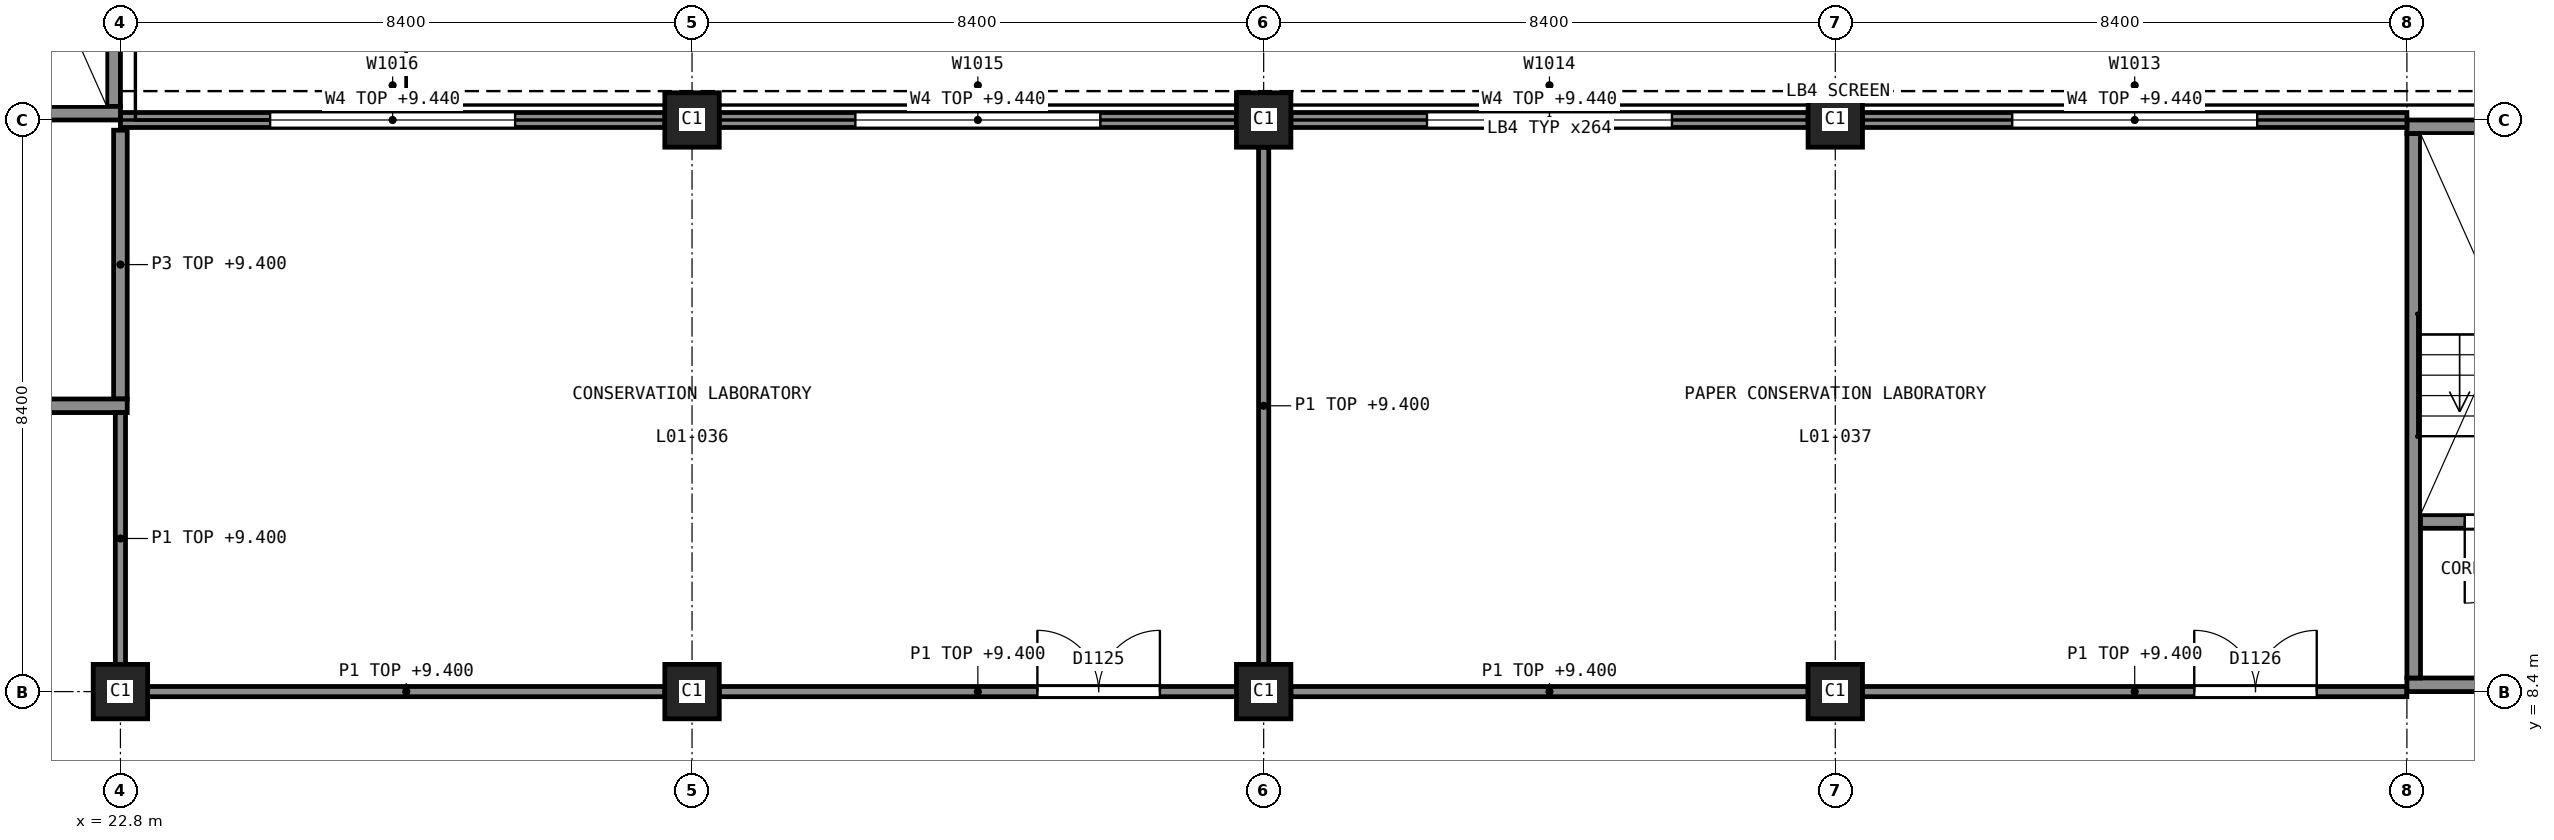
"""IFC4 building model, lengths in metres.
Left out: names, types, materials, properties, quantities, classifications, styles, units other than length and angle.
Written with IfcOpenShell. Run it as: python <this file> out.ifc"""

import sys

from ifc_helpers import new_model, si_unit, direction, frame, frame_2d, origin, origin_2d, place, context, subcontext, project, spatial, rectangle, extrude, element, fill, save


model = new_model("IFC4")
c1 = context("Model", 3, precision=1e-05, world=origin(), true_north=direction((0.0, 1.0)))
c2 = subcontext(c1, "Body", "Model", "MODEL_VIEW")
j1 = project(units=[si_unit("LENGTHUNIT", "METRE"), si_unit("PLANEANGLEUNIT", "RADIAN")], contexts=[c1])
p1 = place(None, origin())
s1 = spatial("IfcSite", under=j1, at=p1, CompositionType="ELEMENT")
p2 = place(p1, origin())
s2 = spatial("IfcBuilding", under=s1, at=p2, CompositionType="ELEMENT")
p3 = place(p2, frame((0.0, 0.0, 5.5)))
s3 = spatial("IfcBuildingStorey", under=s2, at=p3, CompositionType="ELEMENT", Elevation=5.5)
p4 = place(p3, frame((14.4, 16.9, 0.0), z_axis=(0.0, 0.0, 1.0), x_axis=(1.0, 0.0, 0.0)))
e1 = element("IfcWall", 1, at=p4, inside=s3, PredefinedType="SHEAR", context=c2, shape_type="SweptSolid", body=[
    extrude(rectangle(XDim=8.4, YDim=0.2, at=frame_2d((4.2, 0.0))), origin(), (0.0, 0.0, 1.0), 5.0),
])
p5 = place(p3, frame((22.7, 17.0, 0.0), z_axis=(0.0, 0.0, 1.0), x_axis=(0.0, 1.0, 0.0)))
e2 = element("IfcWall", 2, at=p5, inside=s3, PredefinedType="SHEAR", context=c2, shape_type="SweptSolid", body=[
    extrude(rectangle(XDim=8.0, YDim=0.2, at=frame_2d((4.0, 0.0))), origin(), (0.0, 0.0, 1.0), 5.0),
])
p6 = place(p3, frame((56.4, 8.5, 0.0), z_axis=(0.0, 0.0, 1.0), x_axis=(1.0, 0.0, 0.0)))
e3 = element("IfcWall", 3, at=p6, inside=s3, PredefinedType="SHEAR", context=c2, shape_type="SweptSolid", body=[
    extrude(rectangle(XDim=8.4, YDim=0.2, at=frame_2d((4.2, 0.0))), origin(), (0.0, 0.0, 1.0), 5.0),
])
p7 = place(p6, frame((3.3, 0.0, 0.0)))
e4 = element("IfcOpeningElement", 4, at=p7, cuts=e3, PredefinedType="OPENING", context=c2, shape_type="SweptSolid", body=[
    extrude(rectangle(XDim=1.8, YDim=2.1, at=frame_2d((0.9, 1.05))), frame((0.0, 0.11, 0.0), z_axis=(0.0, -1.0, 0.0), x_axis=(1.0, 0.0, 0.0)), (0.0, 0.0, 1.0), 0.22),
])
p8 = place(p3, frame((56.4, 16.7, 0.0), z_axis=(0.0, 0.0, 1.0), x_axis=(1.0, 0.0, 0.0)))
e5 = element("IfcWall", 5, at=p8, inside=s3, PredefinedType="SHEAR", context=c2, shape_type="SweptSolid", body=[
    extrude(rectangle(XDim=8.4, YDim=0.2, at=frame_2d((4.2, 0.0))), origin(), (0.0, 0.0, 1.0), 5.0),
])
p9 = place(p3, frame((56.5, 8.6, 0.0), z_axis=(0.0, 0.0, 1.0), x_axis=(0.0, 1.0, 0.0)))
e6 = element("IfcWall", 6, at=p9, inside=s3, PredefinedType="SHEAR", context=c2, shape_type="SweptSolid", body=[
    extrude(rectangle(XDim=8.0, YDim=0.2, at=frame_2d((4.0, 0.0))), origin(), (0.0, 0.0, 1.0), 5.0),
])
p10 = place(p3, frame((56.6, 10.9, 0.0), z_axis=(0.0, 0.0, 1.0), x_axis=(1.0, 0.0, 0.0)))
e7 = element("IfcWall", 7, at=p10, inside=s3, PredefinedType="SHEAR", context=c2, shape_type="SweptSolid", body=[
    extrude(rectangle(XDim=8.0, YDim=0.2, at=frame_2d((4.0, 0.0))), origin(), (0.0, 0.0, 1.0), 5.0),
])
p11 = place(p10, frame((0.65, 0.0, 0.0)))
e8 = element("IfcOpeningElement", 8, at=p11, cuts=e7, PredefinedType="OPENING", context=c2, shape_type="SweptSolid", body=[
    extrude(rectangle(XDim=1.2, YDim=2.1, at=frame_2d((0.6, 1.05))), frame((0.0, 0.11, 0.0), z_axis=(0.0, -1.0, 0.0), x_axis=(1.0, 0.0, 0.0)), (0.0, 0.0, 1.0), 0.22),
])
p12 = place(p10, frame((6.15, 0.0, 0.0)))
e9 = element("IfcOpeningElement", 9, at=p12, cuts=e7, PredefinedType="OPENING", context=c2, shape_type="SweptSolid", body=[
    extrude(rectangle(XDim=1.2, YDim=2.1, at=frame_2d((0.6, 1.05))), frame((0.0, 0.11, 0.0), z_axis=(0.0, -1.0, 0.0), x_axis=(1.0, 0.0, 0.0)), (0.0, 0.0, 1.0), 0.22),
])
p13 = place(p10, frame((3.45, 0.0, 0.0)))
e10 = element("IfcOpeningElement", 10, at=p13, cuts=e7, PredefinedType="OPENING", context=c2, shape_type="SweptSolid", body=[
    extrude(rectangle(XDim=1.1, YDim=2.1, at=frame_2d((0.55, 1.05))), frame((0.0, 0.11, 0.0), z_axis=(0.0, -1.0, 0.0), x_axis=(1.0, 0.0, 0.0)), (0.0, 0.0, 1.0), 0.22),
])
for number, where, z_axis, x_axis in (
    (11, (22.8, 8.4, 0.0), (0.0, 0.0, 1.0), (1.0, 0.0, 0.0)),
    (12, (31.2, 8.4, 0.0), (0.0, 0.0, 1.0), (1.0, 0.0, 0.0)),
    (13, (31.2, 16.8, 0.0), (0.0, 0.0, 1.0), (1.0, 0.0, 0.0)),
    (14, (39.6, 8.4, 0.0), (0.0, 0.0, 1.0), (1.0, 0.0, 0.0)),
    (15, (39.6, 16.8, 0.0), (0.0, 0.0, 1.0), (1.0, 0.0, 0.0)),
    (16, (48.0, 8.4, 0.0), (0.0, 0.0, 1.0), (1.0, 0.0, 0.0)),
    (17, (48.0, 16.8, 0.0), (0.0, 0.0, 1.0), (1.0, 0.0, 0.0)),
):
    element("IfcColumn", number, at=place(p3, frame(where, z_axis=z_axis, x_axis=x_axis)), inside=s3, PredefinedType="COLUMN", context=c2, shape_type="SweptSolid", body=[
        extrude(rectangle(XDim=0.8, YDim=0.8, at=origin_2d()), origin(), (0.0, 0.0, 1.0), 5.0),
    ])
p14 = place(p3, frame((48.4, 16.8, 0.0), z_axis=(0.0, 0.0, 1.0), x_axis=(1.0, 0.0, 0.0)))
e18 = element("IfcWall", 18, at=p14, inside=s3, PredefinedType="SOLIDWALL", context=c2, shape_type="SweptSolid", body=[
    extrude(rectangle(XDim=8.0, YDim=0.22, at=frame_2d((4.0, 0.0))), origin(), (0.0, 0.0, 1.0), 3.94),
])
p15 = place(p14, frame((2.2, 0.0, 0.9)))
e19 = element("IfcOpeningElement", 19, at=p15, cuts=e18, PredefinedType="OPENING", context=c2, shape_type="SweptSolid", body=[
    extrude(rectangle(XDim=3.6, YDim=1.5, at=frame_2d((1.8, 0.75))), frame((0.0, 0.12, 0.0), z_axis=(0.0, -1.0, 0.0), x_axis=(1.0, 0.0, 0.0)), (0.0, 0.0, 1.0), 0.24),
])
p16 = place(p3, frame((40.0, 16.8, 0.0), z_axis=(0.0, 0.0, 1.0), x_axis=(1.0, 0.0, 0.0)))
e20 = element("IfcWall", 20, at=p16, inside=s3, PredefinedType="SOLIDWALL", context=c2, shape_type="SweptSolid", body=[
    extrude(rectangle(XDim=7.6, YDim=0.22, at=frame_2d((3.8, 0.0))), origin(), (0.0, 0.0, 1.0), 3.94),
])
p17 = place(p16, frame((2.0, 0.0, 0.9)))
e21 = element("IfcOpeningElement", 21, at=p17, cuts=e20, PredefinedType="OPENING", context=c2, shape_type="SweptSolid", body=[
    extrude(rectangle(XDim=3.6, YDim=1.5, at=frame_2d((1.8, 0.75))), frame((0.0, 0.12, 0.0), z_axis=(0.0, -1.0, 0.0), x_axis=(1.0, 0.0, 0.0)), (0.0, 0.0, 1.0), 0.24),
])
p18 = place(p3, frame((31.6, 16.8, 0.0), z_axis=(0.0, 0.0, 1.0), x_axis=(1.0, 0.0, 0.0)))
e22 = element("IfcWall", 22, at=p18, inside=s3, PredefinedType="SOLIDWALL", context=c2, shape_type="SweptSolid", body=[
    extrude(rectangle(XDim=7.6, YDim=0.22, at=frame_2d((3.8, 0.0))), origin(), (0.0, 0.0, 1.0), 3.94),
])
p19 = place(p18, frame((2.0, 0.0, 0.9)))
e23 = element("IfcOpeningElement", 23, at=p19, cuts=e22, PredefinedType="OPENING", context=c2, shape_type="SweptSolid", body=[
    extrude(rectangle(XDim=3.6, YDim=1.5, at=frame_2d((1.8, 0.75))), frame((0.0, 0.12, 0.0), z_axis=(0.0, -1.0, 0.0), x_axis=(1.0, 0.0, 0.0)), (0.0, 0.0, 1.0), 0.24),
])
p20 = place(p3, frame((22.8, 16.8, 0.0), z_axis=(0.0, 0.0, 1.0), x_axis=(1.0, 0.0, 0.0)))
e24 = element("IfcWall", 24, at=p20, inside=s3, PredefinedType="SOLIDWALL", context=c2, shape_type="SweptSolid", body=[
    extrude(rectangle(XDim=8.0, YDim=0.22, at=frame_2d((4.0, 0.0))), origin(), (0.0, 0.0, 1.0), 3.94),
])
p21 = place(p20, frame((2.2, 0.0, 0.9)))
e25 = element("IfcOpeningElement", 25, at=p21, cuts=e24, PredefinedType="OPENING", context=c2, shape_type="SweptSolid", body=[
    extrude(rectangle(XDim=3.6, YDim=1.5, at=frame_2d((1.8, 0.75))), frame((0.0, 0.12, 0.0), z_axis=(0.0, -1.0, 0.0), x_axis=(1.0, 0.0, 0.0)), (0.0, 0.0, 1.0), 0.24),
])
p22 = place(p3, frame((22.8, 12.7, 0.0), z_axis=(0.0, 0.0, 1.0), x_axis=(0.0, 1.0, 0.0)))
e26 = element("IfcWall", 26, at=p22, inside=s3, PredefinedType="PARTITIONING", context=c2, shape_type="SweptSolid", body=[
    extrude(rectangle(XDim=3.95, YDim=0.2, at=frame_2d((1.975, 0.0))), origin(), (0.0, 0.0, 1.0), 3.9),
])
p23 = place(p3, frame((14.4, 12.6, 0.0), z_axis=(0.0, 0.0, 1.0), x_axis=(1.0, 0.0, 0.0)))
e27 = element("IfcWall", 27, at=p23, inside=s3, PredefinedType="PARTITIONING", context=c2, shape_type="SweptSolid", body=[
    extrude(rectangle(XDim=8.5, YDim=0.2, at=frame_2d((4.25, 0.0))), origin(), (0.0, 0.0, 1.0), 3.9),
])
p24 = place(p23, frame((1.775, 0.0, 0.0)))
e28 = element("IfcOpeningElement", 28, at=p24, cuts=e27, PredefinedType="OPENING", context=c2, shape_type="SweptSolid", body=[
    extrude(rectangle(XDim=1.0, YDim=2.1, at=frame_2d((0.5, 1.05))), frame((0.0, 0.11, 0.0), z_axis=(0.0, -1.0, 0.0), x_axis=(1.0, 0.0, 0.0)), (0.0, 0.0, 1.0), 0.22),
])
p25 = place(p3, frame((39.6, 8.8, 0.0), z_axis=(0.0, 0.0, 1.0), x_axis=(0.0, 1.0, 0.0)))
e29 = element("IfcWall", 29, at=p25, inside=s3, PredefinedType="PARTITIONING", context=c2, shape_type="SweptSolid", body=[
    extrude(rectangle(XDim=7.6, YDim=0.15, at=frame_2d((3.8, 0.0))), origin(), (0.0, 0.0, 1.0), 3.9),
])
p26 = place(p3, frame((23.2, 8.4, 0.0), z_axis=(0.0, 0.0, 1.0), x_axis=(1.0, 0.0, 0.0)))
e30 = element("IfcWall", 30, at=p26, inside=s3, PredefinedType="PARTITIONING", context=c2, shape_type="SweptSolid", body=[
    extrude(rectangle(XDim=7.6, YDim=0.15, at=frame_2d((3.8, 0.0))), origin(), (0.0, 0.0, 1.0), 3.9),
])
p27 = place(p3, frame((31.6, 8.4, 0.0), z_axis=(0.0, 0.0, 1.0), x_axis=(1.0, 0.0, 0.0)))
e31 = element("IfcWall", 31, at=p27, inside=s3, PredefinedType="PARTITIONING", context=c2, shape_type="SweptSolid", body=[
    extrude(rectangle(XDim=7.6, YDim=0.15, at=frame_2d((3.8, 0.0))), origin(), (0.0, 0.0, 1.0), 3.9),
])
p28 = place(p27, frame((4.675, 0.0, 0.0)))
e32 = element("IfcOpeningElement", 32, at=p28, cuts=e31, PredefinedType="OPENING", context=c2, shape_type="SweptSolid", body=[
    extrude(rectangle(XDim=1.8, YDim=2.1, at=frame_2d((0.9, 1.05))), frame((0.0, 0.085, 0.0), z_axis=(0.0, -1.0, 0.0), x_axis=(1.0, 0.0, 0.0)), (0.0, 0.0, 1.0), 0.17),
])
p29 = place(p3, frame((40.0, 8.4, 0.0), z_axis=(0.0, 0.0, 1.0), x_axis=(1.0, 0.0, 0.0)))
e33 = element("IfcWall", 33, at=p29, inside=s3, PredefinedType="PARTITIONING", context=c2, shape_type="SweptSolid", body=[
    extrude(rectangle(XDim=7.6, YDim=0.15, at=frame_2d((3.8, 0.0))), origin(), (0.0, 0.0, 1.0), 3.9),
])
p30 = place(p3, frame((48.4, 8.4, 0.0), z_axis=(0.0, 0.0, 1.0), x_axis=(1.0, 0.0, 0.0)))
e34 = element("IfcWall", 34, at=p30, inside=s3, PredefinedType="PARTITIONING", context=c2, shape_type="SweptSolid", body=[
    extrude(rectangle(XDim=8.0, YDim=0.15, at=frame_2d((4.0, 0.0))), origin(), (0.0, 0.0, 1.0), 3.9),
])
p31 = place(p30, frame((4.875, 0.0, 0.0)))
e35 = element("IfcOpeningElement", 35, at=p31, cuts=e34, PredefinedType="OPENING", context=c2, shape_type="SweptSolid", body=[
    extrude(rectangle(XDim=1.8, YDim=2.1, at=frame_2d((0.9, 1.05))), frame((0.0, 0.085, 0.0), z_axis=(0.0, -1.0, 0.0), x_axis=(1.0, 0.0, 0.0)), (0.0, 0.0, 1.0), 0.17),
])
p32 = place(p3, frame((22.8, 8.8, 0.0), z_axis=(0.0, 0.0, 1.0), x_axis=(0.0, 1.0, 0.0)))
e36 = element("IfcWall", 36, at=p32, inside=s3, PredefinedType="PARTITIONING", context=c2, shape_type="SweptSolid", body=[
    extrude(rectangle(XDim=3.7, YDim=0.15, at=frame_2d((1.85, 0.0))), origin(), (0.0, 0.0, 1.0), 3.9),
])
p33 = place(p15, origin())
e37 = element("IfcWindow", 37, at=p33, inside=s3, PartitioningType="DOUBLE_PANEL_VERTICAL", PredefinedType="WINDOW", context=c2, shape_type="SweptSolid", body=[
    extrude(rectangle(XDim=3.6, YDim=1.5, at=frame_2d((1.8, 0.75))), frame((0.0, -0.03, 0.0), z_axis=(0.0, -1.0, 0.0), x_axis=(1.0, 0.0, 0.0)), (0.0, 0.0, 1.0), 0.06),
])
fill(e19, e37)
p34 = place(p17, origin())
e38 = element("IfcWindow", 38, at=p34, inside=s3, PartitioningType="DOUBLE_PANEL_VERTICAL", PredefinedType="WINDOW", context=c2, shape_type="SweptSolid", body=[
    extrude(rectangle(XDim=3.6, YDim=1.5, at=frame_2d((1.8, 0.75))), frame((0.0, -0.03, 0.0), z_axis=(0.0, -1.0, 0.0), x_axis=(1.0, 0.0, 0.0)), (0.0, 0.0, 1.0), 0.06),
])
fill(e21, e38)
p35 = place(p19, origin())
e39 = element("IfcWindow", 39, at=p35, inside=s3, PartitioningType="DOUBLE_PANEL_VERTICAL", PredefinedType="WINDOW", context=c2, shape_type="SweptSolid", body=[
    extrude(rectangle(XDim=3.6, YDim=1.5, at=frame_2d((1.8, 0.75))), frame((0.0, -0.03, 0.0), z_axis=(0.0, -1.0, 0.0), x_axis=(1.0, 0.0, 0.0)), (0.0, 0.0, 1.0), 0.06),
])
fill(e23, e39)
p36 = place(p21, origin())
e40 = element("IfcWindow", 40, at=p36, inside=s3, PartitioningType="DOUBLE_PANEL_VERTICAL", PredefinedType="WINDOW", context=c2, shape_type="SweptSolid", body=[
    extrude(rectangle(XDim=3.6, YDim=1.5, at=frame_2d((1.8, 0.75))), frame((0.0, -0.03, 0.0), z_axis=(0.0, -1.0, 0.0), x_axis=(1.0, 0.0, 0.0)), (0.0, 0.0, 1.0), 0.06),
])
fill(e25, e40)
p37 = place(p28, origin())
e41 = element("IfcDoor", 41, at=p37, inside=s3, OperationType="DOUBLE_DOOR_SINGLE_SWING", PredefinedType="DOOR", context=c2, shape_type="SweptSolid", body=[
    extrude(rectangle(XDim=1.8, YDim=2.1, at=frame_2d((0.9, 1.05))), frame((0.0, 0.025, 0.0), z_axis=(0.0, -1.0, 0.0), x_axis=(1.0, 0.0, 0.0)), (0.0, 0.0, 1.0), 0.05),
])
fill(e32, e41)
p38 = place(p31, origin())
e42 = element("IfcDoor", 42, at=p38, inside=s3, OperationType="DOUBLE_DOOR_SINGLE_SWING", PredefinedType="DOOR", context=c2, shape_type="SweptSolid", body=[
    extrude(rectangle(XDim=1.8, YDim=2.1, at=frame_2d((0.9, 1.05))), frame((0.0, 0.025, 0.0), z_axis=(0.0, -1.0, 0.0), x_axis=(1.0, 0.0, 0.0)), (0.0, 0.0, 1.0), 0.05),
])
fill(e35, e42)
p39 = place(p11, origin())
e43 = element("IfcDoor", 43, at=p39, inside=s3, OperationType="SINGLE_SWING_LEFT", PredefinedType="DOOR", context=c2, shape_type="SweptSolid", body=[
    extrude(rectangle(XDim=1.2, YDim=2.1, at=frame_2d((0.6, 1.05))), frame((0.0, 0.025, 0.0), z_axis=(0.0, -1.0, 0.0), x_axis=(1.0, 0.0, 0.0)), (0.0, 0.0, 1.0), 0.05),
])
fill(e8, e43)
save(model, sys.argv[1])
